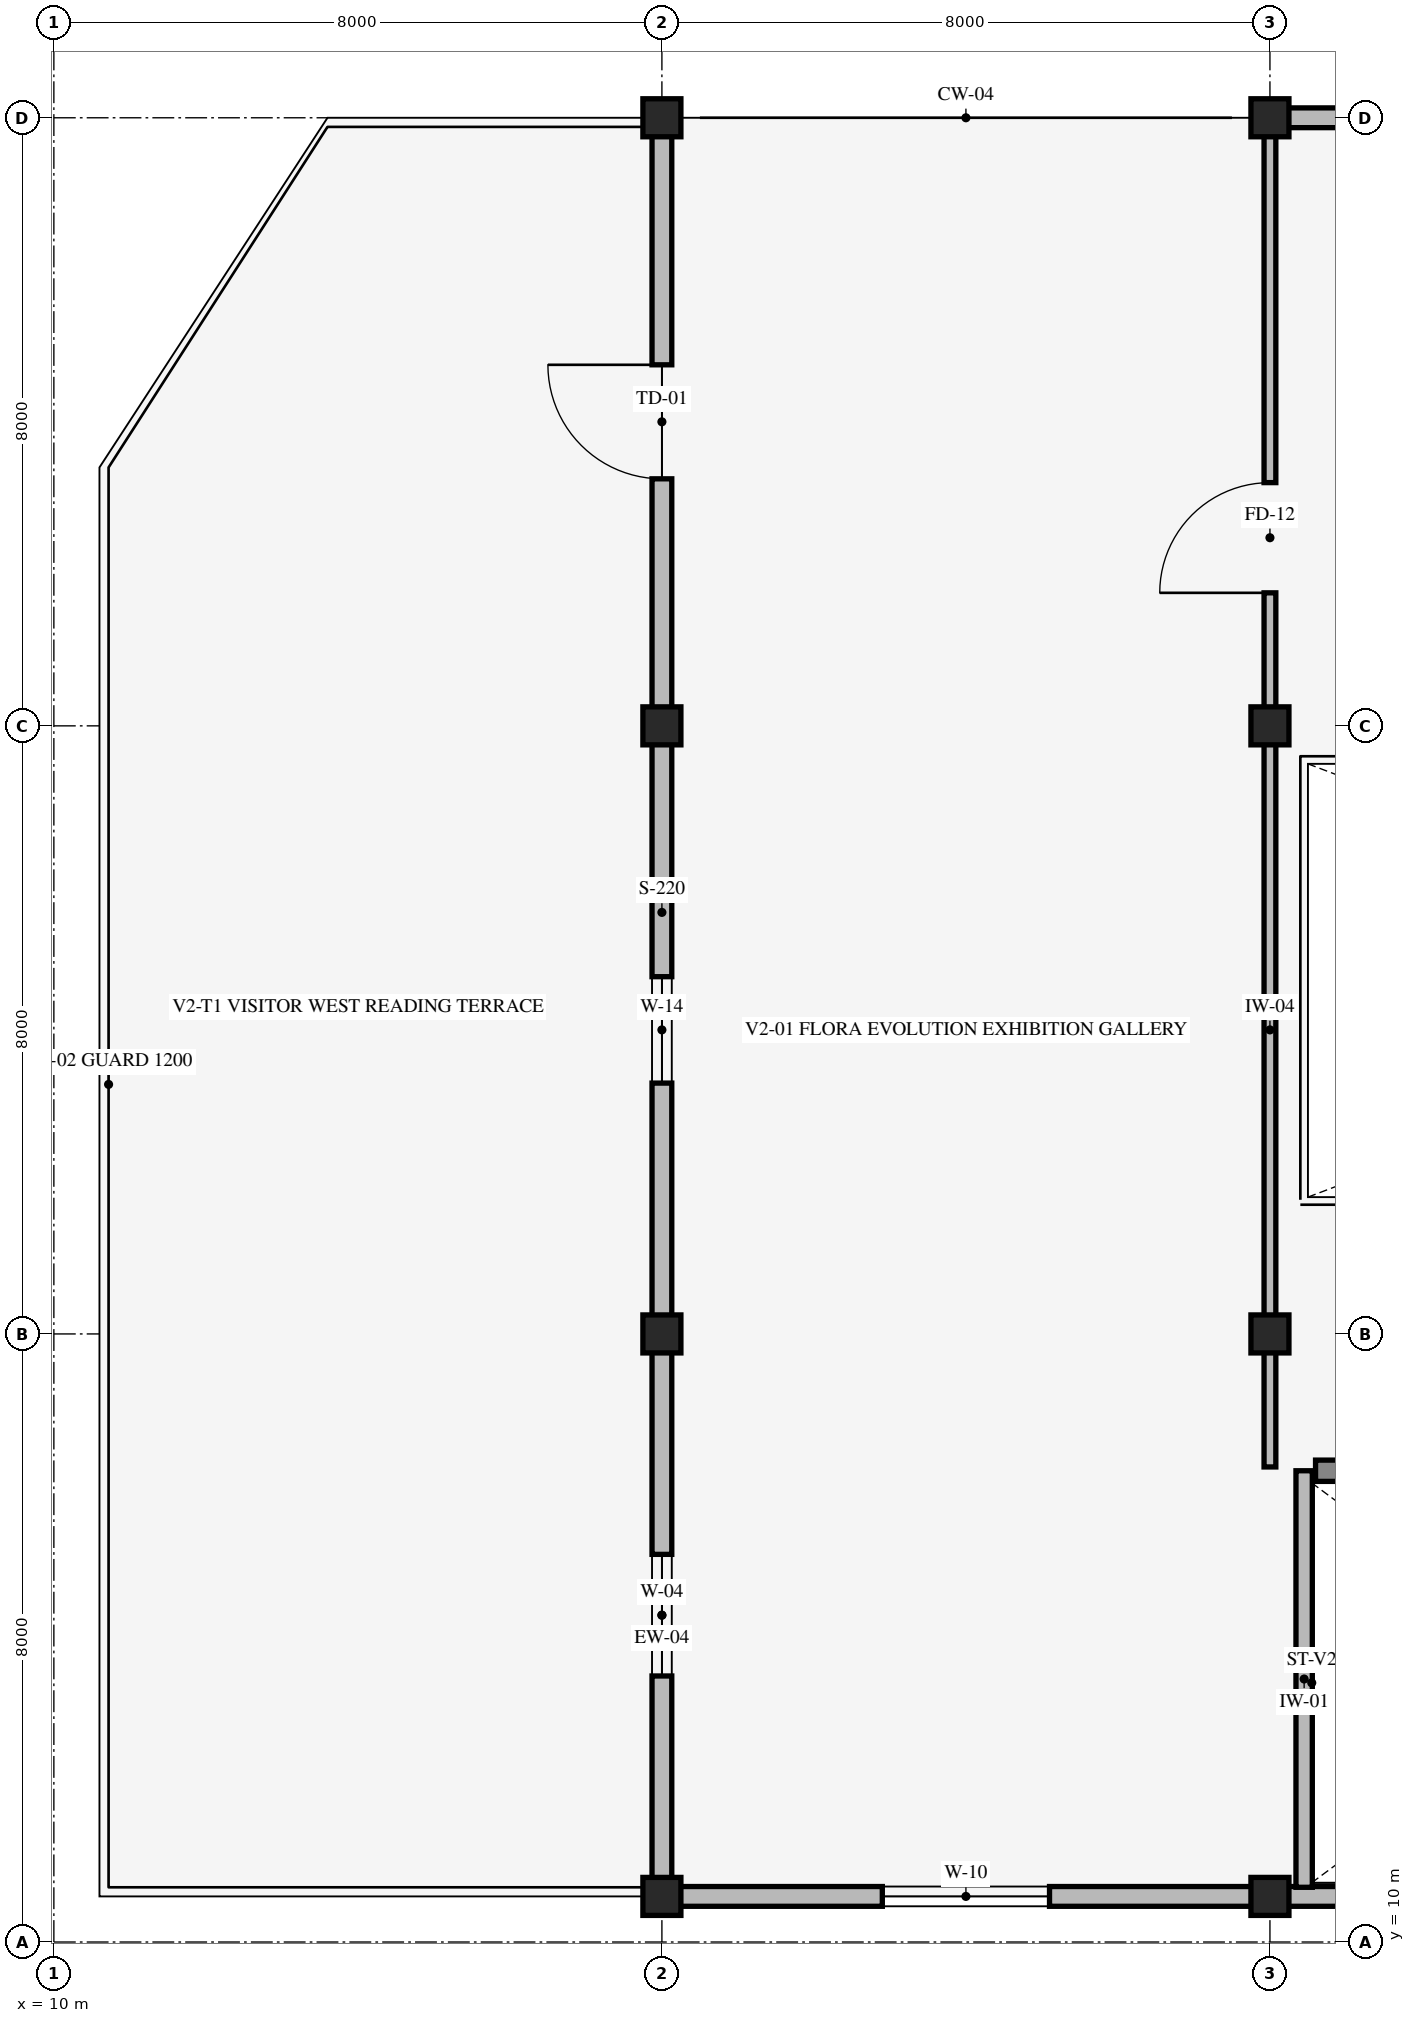
"""IFC4 building model, lengths in metres.
Left out: names, types, materials, properties, quantities, classifications, styles, units other than length and angle.
Written with IfcOpenShell. Run it as: python <this file> out.ifc"""

import sys

from ifc_helpers import new_model, si_unit, direction, frame, frame_2d, origin, origin_2d, place, context, subcontext, project, spatial, rectangle, extrude, element, fill, save


model = new_model("IFC4")
c1 = context("Model", 3, precision=1e-05, world=origin(), true_north=direction((0.0, 1.0)))
c2 = subcontext(c1, "Body", "Model", "MODEL_VIEW")
j1 = project(units=[si_unit("LENGTHUNIT", "METRE"), si_unit("PLANEANGLEUNIT", "RADIAN")], contexts=[c1])
p1 = place(None, origin())
s1 = spatial("IfcSite", under=j1, at=p1, CompositionType="ELEMENT")
p2 = place(p1, origin())
s2 = spatial("IfcBuilding", under=s1, at=p2, CompositionType="ELEMENT")
p3 = place(p2, frame((0.0, 0.0, 5.4)))
s3 = spatial("IfcBuildingStorey", under=s2, at=p3, CompositionType="ELEMENT", Elevation=5.4)
for number, where, z_axis, x_axis in (
    (1, (18.0, 10.6, 0.0), (0.0, 0.0, 1.0), (1.0, 0.0, 0.0)),
    (2, (18.0, 18.0, 0.0), (0.0, 0.0, 1.0), (1.0, 0.0, 0.0)),
    (3, (18.0, 26.0, 0.0), (0.0, 0.0, 1.0), (1.0, 0.0, 0.0)),
    (4, (18.0, 34.0, 0.0), (0.0, 0.0, 1.0), (1.0, 0.0, 0.0)),
    (5, (26.0, 10.6, 0.0), (0.0, 0.0, 1.0), (1.0, 0.0, 0.0)),
    (6, (26.0, 18.0, 0.0), (0.0, 0.0, 1.0), (1.0, 0.0, 0.0)),
    (7, (26.0, 26.0, 0.0), (0.0, 0.0, 1.0), (1.0, 0.0, 0.0)),
    (8, (26.0, 34.0, 0.0), (0.0, 0.0, 1.0), (1.0, 0.0, 0.0)),
):
    element("IfcColumn", number, at=place(p3, frame(where, z_axis=z_axis, x_axis=x_axis)), inside=s3, PredefinedType="COLUMN", context=c2, shape_type="SweptSolid", body=[
        extrude(rectangle(XDim=0.5, YDim=0.5, at=origin_2d()), origin(), (0.0, 0.0, 1.0), 4.8),
    ])
p4 = place(p3, frame((34.0, 10.6, 0.0), z_axis=(0.0, 0.0, 1.0), x_axis=(-1.0, 0.0, 0.0)))
e9 = element("IfcWall", 9, at=p4, inside=s3, PredefinedType="STANDARD", context=c2, shape_type="SweptSolid", body=[
    extrude(rectangle(XDim=8.0, YDim=0.26, at=frame_2d((4.0, 0.0))), origin(), (0.0, 0.0, 1.0), 3.94),
])
p5 = place(p3, frame((26.0, 10.6, 0.0), z_axis=(0.0, 0.0, 1.0), x_axis=(-1.0, 0.0, 0.0)))
e10 = element("IfcWall", 10, at=p5, inside=s3, PredefinedType="STANDARD", context=c2, shape_type="SweptSolid", body=[
    extrude(rectangle(XDim=8.0, YDim=0.26, at=frame_2d((4.0, 0.0))), origin(), (0.0, 0.0, 1.0), 4.01),
])
p6 = place(p5, frame((2.9, 0.0, 0.85)))
e11 = element("IfcOpeningElement", 11, at=p6, cuts=e10, PredefinedType="OPENING", context=c2, shape_type="SweptSolid", body=[
    extrude(rectangle(XDim=2.2, YDim=1.4, at=frame_2d((1.1, 0.7))), frame((0.0, 0.14, 0.0), z_axis=(0.0, -1.0, 0.0), x_axis=(1.0, 0.0, 0.0)), (0.0, 0.0, 1.0), 0.28),
])
p7 = place(p3, frame((18.0, 10.6, 0.0), z_axis=(0.0, 0.0, 1.0), x_axis=(0.0, 1.0, 0.0)))
e12 = element("IfcWall", 12, at=p7, inside=s3, PredefinedType="STANDARD", context=c2, shape_type="SweptSolid", body=[
    extrude(rectangle(XDim=7.4, YDim=0.26, at=frame_2d((3.7, 0.0))), origin(), (0.0, 0.0, 1.0), 4.01),
])
p8 = place(p7, frame((2.9, 0.0, 0.85)))
e13 = element("IfcOpeningElement", 13, at=p8, cuts=e12, PredefinedType="OPENING", context=c2, shape_type="SweptSolid", body=[
    extrude(rectangle(XDim=1.6, YDim=1.2, at=frame_2d((0.8, 0.6))), frame((0.0, 0.14, 0.0), z_axis=(0.0, -1.0, 0.0), x_axis=(1.0, 0.0, 0.0)), (0.0, 0.0, 1.0), 0.28),
])
p9 = place(p3, frame((18.0, 18.0, 0.0), z_axis=(0.0, 0.0, 1.0), x_axis=(0.0, 1.0, 0.0)))
e14 = element("IfcWall", 14, at=p9, inside=s3, PredefinedType="STANDARD", context=c2, shape_type="SweptSolid", body=[
    extrude(rectangle(XDim=8.0, YDim=0.26, at=frame_2d((4.0, 0.0))), origin(), (0.0, 0.0, 1.0), 4.01),
])
p10 = place(p9, frame((3.3, 0.0, 0.85)))
e15 = element("IfcOpeningElement", 15, at=p10, cuts=e14, PredefinedType="OPENING", context=c2, shape_type="SweptSolid", body=[
    extrude(rectangle(XDim=1.4, YDim=1.9, at=frame_2d((0.7, 0.95))), frame((0.0, 0.14, 0.0), z_axis=(0.0, -1.0, 0.0), x_axis=(1.0, 0.0, 0.0)), (0.0, 0.0, 1.0), 0.28),
])
p11 = place(p3, frame((18.0, 26.0, 0.0), z_axis=(0.0, 0.0, 1.0), x_axis=(0.0, 1.0, 0.0)))
e16 = element("IfcWall", 16, at=p11, inside=s3, PredefinedType="STANDARD", context=c2, shape_type="SweptSolid", body=[
    extrude(rectangle(XDim=8.0, YDim=0.26, at=frame_2d((4.0, 0.0))), origin(), (0.0, 0.0, 1.0), 4.01),
])
p12 = place(p11, frame((3.25, 0.0, 0.0)))
e17 = element("IfcOpeningElement", 17, at=p12, cuts=e16, PredefinedType="OPENING", context=c2, shape_type="SweptSolid", body=[
    extrude(rectangle(XDim=1.5, YDim=2.25, at=frame_2d((0.75, 1.125))), frame((0.0, 0.14, 0.0), z_axis=(0.0, -1.0, 0.0), x_axis=(1.0, 0.0, 0.0)), (0.0, 0.0, 1.0), 0.28),
])
p13 = place(p3, frame((26.0, 34.0, 0.0), z_axis=(0.0, 0.0, 1.0), x_axis=(1.0, 0.0, 0.0)))
e18 = element("IfcWall", 18, at=p13, inside=s3, PredefinedType="STANDARD", context=c2, shape_type="SweptSolid", body=[
    extrude(rectangle(XDim=8.0, YDim=0.26, at=frame_2d((4.0, 0.0))), origin(), (0.0, 0.0, 1.0), 3.94),
])
p14 = place(p13, frame((3.4, 0.0, 0.85)))
e19 = element("IfcOpeningElement", 19, at=p14, cuts=e18, PredefinedType="OPENING", context=c2, shape_type="SweptSolid", body=[
    extrude(rectangle(XDim=1.2, YDim=1.8, at=frame_2d((0.6, 0.9))), frame((0.0, 0.14, 0.0), z_axis=(0.0, -1.0, 0.0), x_axis=(1.0, 0.0, 0.0)), (0.0, 0.0, 1.0), 0.28),
])
p15 = place(p3, frame((26.6, 16.2, 0.0), z_axis=(0.0, 0.0, 1.0), x_axis=(1.0, 0.0, 0.0)))
e20 = element("IfcWall", 20, at=p15, inside=s3, PredefinedType="SHEAR", context=c2, shape_type="SweptSolid", body=[
    extrude(rectangle(XDim=9.75, YDim=0.28, at=frame_2d((4.875, 0.0))), origin(), (0.0, 0.0, 1.0), 4.56),
])
p16 = place(p3, frame((26.45, 16.2, 0.0), z_axis=(0.0, 0.0, 1.0), x_axis=(0.0, -1.0, 0.0)))
e21 = element("IfcWall", 21, at=p16, inside=s3, PredefinedType="STANDARD", context=c2, shape_type="SweptSolid", body=[
    extrude(rectangle(XDim=5.48, YDim=0.215, at=frame_2d((2.74, 0.0))), origin(), (0.0, 0.0, 1.0), 3.94),
])
p17 = place(p3, frame((26.0, 16.25, 0.0), z_axis=(0.0, 0.0, 1.0), x_axis=(0.0, 1.0, 0.0)))
e22 = element("IfcWall", 22, at=p17, inside=s3, PredefinedType="STANDARD", context=c2, shape_type="SweptSolid", body=[
    extrude(rectangle(XDim=17.7, YDim=0.155, at=frame_2d((8.85, 0.0))), origin(), (0.0, 0.0, 1.0), 3.94),
])
p18 = place(p17, frame((11.5, 0.0, 0.0)))
e23 = element("IfcOpeningElement", 23, at=p18, cuts=e22, PredefinedType="OPENING", context=c2, shape_type="SweptSolid", body=[
    extrude(rectangle(XDim=1.45, YDim=2.2, at=frame_2d((0.725, 1.1))), frame((0.0, 0.087, 0.0), z_axis=(0.0, -1.0, 0.0), x_axis=(1.0, 0.0, 0.0)), (0.0, 0.0, 1.0), 0.175),
])
p19 = place(p6, origin())
e24 = element("IfcWindow", 24, at=p19, inside=s3, PartitioningType="SINGLE_PANEL", PredefinedType="WINDOW", context=c2, shape_type="SweptSolid", body=[
    extrude(rectangle(XDim=2.2, YDim=1.4, at=frame_2d((1.1, 0.7))), frame((0.0, 0.03, 0.0), z_axis=(0.0, -1.0, 0.0), x_axis=(1.0, 0.0, 0.0)), (0.0, 0.0, 1.0), 0.06),
])
fill(e11, e24)
p20 = place(p8, origin())
e25 = element("IfcWindow", 25, at=p20, inside=s3, PartitioningType="SINGLE_PANEL", PredefinedType="WINDOW", context=c2, shape_type="SweptSolid", body=[
    extrude(rectangle(XDim=1.6, YDim=1.2, at=frame_2d((0.8, 0.6))), frame((0.0, 0.03, 0.0), z_axis=(0.0, -1.0, 0.0), x_axis=(1.0, 0.0, 0.0)), (0.0, 0.0, 1.0), 0.06),
])
fill(e13, e25)
p21 = place(p10, origin())
e26 = element("IfcWindow", 26, at=p21, inside=s3, PartitioningType="SINGLE_PANEL", PredefinedType="WINDOW", context=c2, shape_type="SweptSolid", body=[
    extrude(rectangle(XDim=1.4, YDim=1.9, at=frame_2d((0.7, 0.95))), frame((0.0, 0.03, 0.0), z_axis=(0.0, -1.0, 0.0), x_axis=(1.0, 0.0, 0.0)), (0.0, 0.0, 1.0), 0.06),
])
fill(e15, e26)
p22 = place(p12, origin())
e27 = element("IfcDoor", 27, at=p22, inside=s3, OperationType="SINGLE_SWING_RIGHT", PredefinedType="DOOR", context=c2, shape_type="SweptSolid", body=[
    extrude(rectangle(XDim=1.5, YDim=2.25, at=frame_2d((0.75, 1.125))), frame((0.0, 0.025, 0.0), z_axis=(0.0, -1.0, 0.0), x_axis=(1.0, 0.0, 0.0)), (0.0, 0.0, 1.0), 0.05),
])
fill(e17, e27)
p23 = place(p18, origin())
e28 = element("IfcDoor", 28, at=p23, inside=s3, OperationType="SINGLE_SWING_LEFT", PredefinedType="DOOR", context=c2, shape_type="SweptSolid", body=[
    extrude(rectangle(XDim=1.45, YDim=2.2, at=frame_2d((0.725, 1.1))), frame((0.0, 0.025, 0.0), z_axis=(0.0, -1.0, 0.0), x_axis=(1.0, 0.0, 0.0)), (0.0, 0.0, 1.0), 0.05),
])
fill(e23, e28)
save(model, sys.argv[1])
